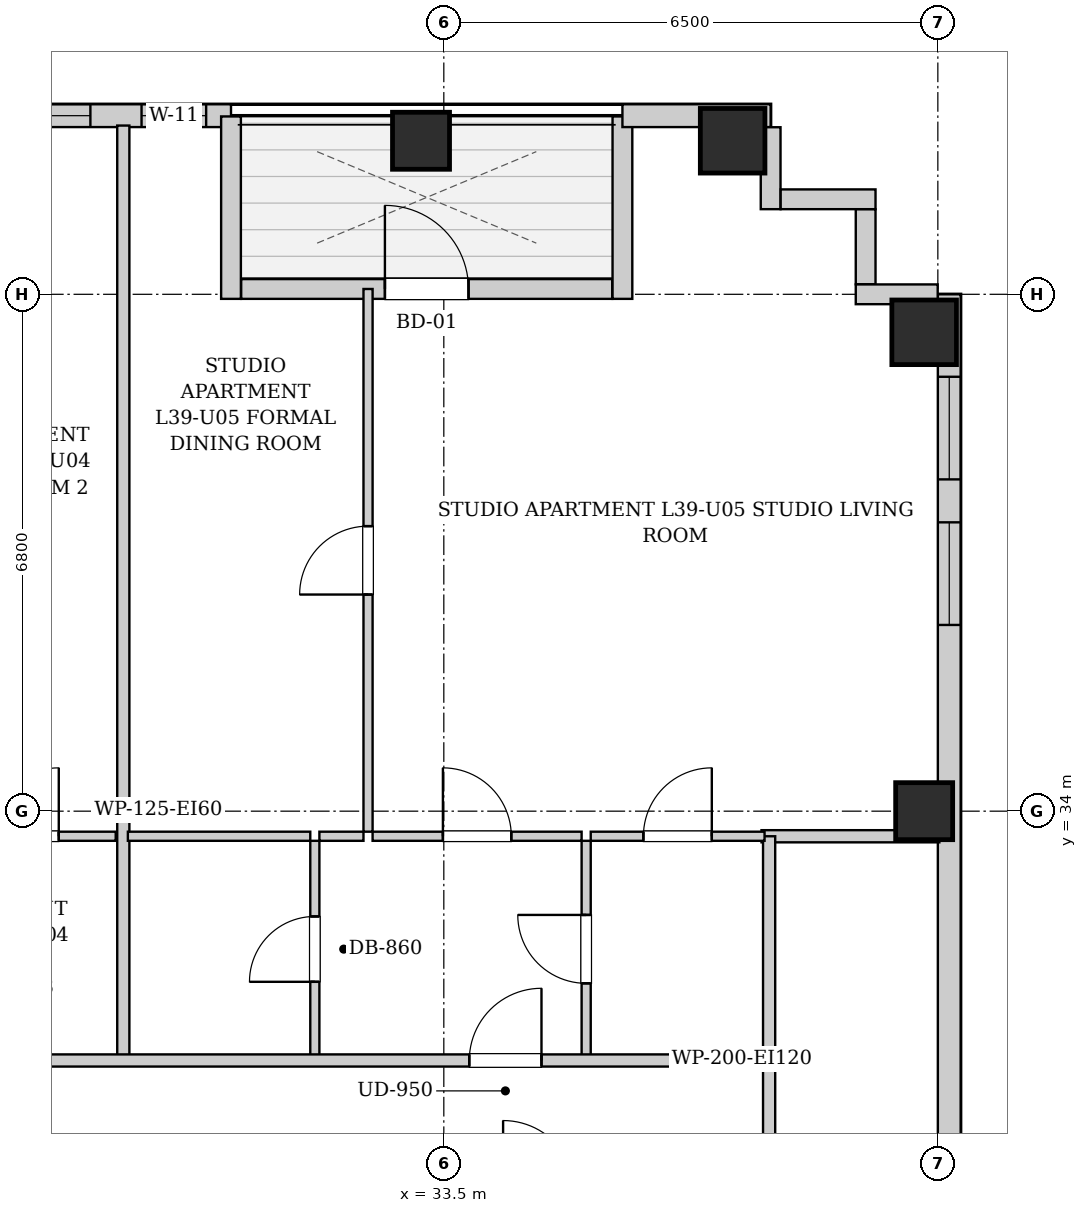
"""IFC4 building model, lengths in metres.
Left out: names, types, materials, properties, quantities, classifications, styles, units other than length and angle.
Written with IfcOpenShell. Run it as: python <this file> out.ifc"""

import sys

from ifc_helpers import new_model, si_unit, direction, frame, frame_2d, origin, origin_2d, place, context, subcontext, project, spatial, rectangle, extrude, element, fill, save


model = new_model("IFC4")
c1 = context("Model", 3, precision=1e-05, world=origin(), true_north=direction((0.0, 1.0)))
c2 = subcontext(c1, "Body", "Model", "MODEL_VIEW")
j1 = project(units=[si_unit("LENGTHUNIT", "METRE"), si_unit("PLANEANGLEUNIT", "RADIAN")], contexts=[c1])
p1 = place(None, origin())
s1 = spatial("IfcSite", under=j1, at=p1, CompositionType="ELEMENT")
p2 = place(p1, origin())
s2 = spatial("IfcBuilding", under=s1, at=p2, CompositionType="ELEMENT")
p3 = place(p2, frame((0.0, 0.0, 137.4)))
s3 = spatial("IfcBuildingStorey", under=s2, at=p3, CompositionType="ELEMENT", Elevation=137.4)
p4 = place(p3, frame((33.2, 42.82, 0.0), z_axis=(0.0, 0.0, 1.0), x_axis=(1.0, 0.0, 0.0)))
e1 = element("IfcColumn", 1, at=p4, inside=s3, PredefinedType="COLUMN", context=c2, shape_type="SweptSolid", body=[
    extrude(rectangle(XDim=0.75, YDim=0.75, at=origin_2d()), origin(), (0.0, 0.0, 1.0), 3.25),
])
p5 = place(p3, frame((37.3, 42.82, 0.0), z_axis=(0.0, 0.0, 1.0), x_axis=(1.0, 0.0, 0.0)))
e2 = element("IfcColumn", 2, at=p5, inside=s3, PredefinedType="COLUMN", context=c2, shape_type="SweptSolid", body=[
    extrude(rectangle(XDim=0.85, YDim=0.85, at=origin_2d()), origin(), (0.0, 0.0, 1.0), 3.25),
])
p6 = place(p3, frame((39.82, 34.0, 0.0), z_axis=(0.0, 0.0, 1.0), x_axis=(1.0, 0.0, 0.0)))
e3 = element("IfcColumn", 3, at=p6, inside=s3, PredefinedType="COLUMN", context=c2, shape_type="SweptSolid", body=[
    extrude(rectangle(XDim=0.75, YDim=0.75, at=origin_2d()), origin(), (0.0, 0.0, 1.0), 3.25),
])
p7 = place(p3, frame((39.82, 40.3, 0.0), z_axis=(0.0, 0.0, 1.0), x_axis=(1.0, 0.0, 0.0)))
e4 = element("IfcColumn", 4, at=p7, inside=s3, PredefinedType="COLUMN", context=c2, shape_type="SweptSolid", body=[
    extrude(rectangle(XDim=0.85, YDim=0.85, at=origin_2d()), origin(), (0.0, 0.0, 1.0), 3.25),
])
p8 = place(p3, frame((16.6, 43.15, 0.0), z_axis=(0.0, 0.0, 1.0), x_axis=(1.0, 0.0, 0.0)))
e5 = element("IfcWall", 5, at=p8, inside=s3, PredefinedType="SOLIDWALL", context=c2, shape_type="SweptSolid", body=[
    extrude(rectangle(XDim=14.1, YDim=0.3, at=frame_2d((7.05, 0.0))), origin(), (0.0, 0.0, 1.0), 2.99),
])
p9 = place(p8, frame((2.357, 0.0, 0.55)))
e6 = element("IfcOpeningElement", 6, at=p9, cuts=e5, PredefinedType="OPENING", context=c2, shape_type="SweptSolid", body=[
    extrude(rectangle(XDim=1.35, YDim=1.2, at=frame_2d((0.675, 0.6))), frame((0.0, 0.16, 0.0), z_axis=(0.0, -1.0, 0.0), x_axis=(1.0, 0.0, 0.0)), (0.0, 0.0, 1.0), 0.32),
])
p10 = place(p8, frame((4.55, 0.0, 0.55)))
e7 = element("IfcOpeningElement", 7, at=p10, cuts=e5, PredefinedType="OPENING", context=c2, shape_type="SweptSolid", body=[
    extrude(rectangle(XDim=1.35, YDim=1.2, at=frame_2d((0.675, 0.6))), frame((0.0, 0.16, 0.0), z_axis=(0.0, -1.0, 0.0), x_axis=(1.0, 0.0, 0.0)), (0.0, 0.0, 1.0), 0.32),
])
p11 = place(p8, frame((10.9, 0.0, 0.55)))
e8 = element("IfcOpeningElement", 8, at=p11, cuts=e5, PredefinedType="OPENING", context=c2, shape_type="SweptSolid", body=[
    extrude(rectangle(XDim=1.35, YDim=1.2, at=frame_2d((0.675, 0.6))), frame((0.0, 0.16, 0.0), z_axis=(0.0, -1.0, 0.0), x_axis=(1.0, 0.0, 0.0)), (0.0, 0.0, 1.0), 0.32),
])
p12 = place(p8, frame((12.923, 0.0, 0.55)))
e9 = element("IfcOpeningElement", 9, at=p12, cuts=e5, PredefinedType="OPENING", context=c2, shape_type="SweptSolid", body=[
    extrude(rectangle(XDim=0.85, YDim=1.2, at=frame_2d((0.425, 0.6))), frame((0.0, 0.16, 0.0), z_axis=(0.0, -1.0, 0.0), x_axis=(1.0, 0.0, 0.0)), (0.0, 0.0, 1.0), 0.32),
])
p13 = place(p3, frame((30.7, 43.14, 0.0), z_axis=(0.0, 0.0, 1.0), x_axis=(0.0, -1.0, 0.0)))
e10 = element("IfcWall", 10, at=p13, inside=s3, PredefinedType="SOLIDWALL", context=c2, shape_type="SweptSolid", body=[
    extrude(rectangle(XDim=2.4, YDim=0.26, at=frame_2d((1.2, 0.0))), origin(), (0.0, 0.0, 1.0), 2.99),
])
p14 = place(p3, frame((30.834, 40.87, 0.0), z_axis=(0.0, 0.0, 1.0), x_axis=(1.0, 0.0, 0.0)))
e11 = element("IfcWall", 11, at=p14, inside=s3, PredefinedType="SOLIDWALL", context=c2, shape_type="SweptSolid", body=[
    extrude(rectangle(XDim=4.882, YDim=0.26, at=frame_2d((2.441, 0.0))), origin(), (0.0, 0.0, 1.0), 2.99),
])
p15 = place(p14, frame((1.891, 0.0, 0.0)))
e12 = element("IfcOpeningElement", 12, at=p15, cuts=e11, PredefinedType="OPENING", context=c2, shape_type="SweptSolid", body=[
    extrude(rectangle(XDim=1.1, YDim=2.0, at=frame_2d((0.55, 1.0))), frame((0.0, 0.14, 0.0), z_axis=(0.0, -1.0, 0.0), x_axis=(1.0, 0.0, 0.0)), (0.0, 0.0, 1.0), 0.28),
])
p16 = place(p3, frame((35.85, 40.74, 0.0), z_axis=(0.0, 0.0, 1.0), x_axis=(0.0, 1.0, 0.0)))
e13 = element("IfcWall", 13, at=p16, inside=s3, PredefinedType="SOLIDWALL", context=c2, shape_type="SweptSolid", body=[
    extrude(rectangle(XDim=2.4, YDim=0.26, at=frame_2d((1.2, 0.0))), origin(), (0.0, 0.0, 1.0), 2.99),
])
p17 = place(p3, frame((35.85, 43.15, 0.0), z_axis=(0.0, 0.0, 1.0), x_axis=(1.0, 0.0, 0.0)))
e14 = element("IfcWall", 14, at=p17, inside=s3, PredefinedType="SOLIDWALL", context=c2, shape_type="SweptSolid", body=[
    extrude(rectangle(XDim=1.95, YDim=0.3, at=frame_2d((0.975, 0.0))), origin(), (0.0, 0.0, 1.0), 2.99),
])
p18 = place(p3, frame((40.15, 40.8, 0.0), z_axis=(0.0, 0.0, 1.0), x_axis=(0.0, -1.0, 0.0)))
e15 = element("IfcWall", 15, at=p18, inside=s3, PredefinedType="SOLIDWALL", context=c2, shape_type="SweptSolid", body=[
    extrude(rectangle(XDim=34.5, YDim=0.3, at=frame_2d((17.25, 0.0))), origin(), (0.0, 0.0, 1.0), 2.99),
])
p19 = place(p18, frame((31.725, 0.0, 0.55)))
e16 = element("IfcOpeningElement", 16, at=p19, cuts=e15, PredefinedType="OPENING", context=c2, shape_type="SweptSolid", body=[
    extrude(rectangle(XDim=1.35, YDim=1.2, at=frame_2d((0.675, 0.6))), frame((0.0, 0.16, 0.0), z_axis=(0.0, -1.0, 0.0), x_axis=(1.0, 0.0, 0.0)), (0.0, 0.0, 1.0), 0.32),
])
p20 = place(p18, frame((3.0, 0.0, 0.55)))
e17 = element("IfcOpeningElement", 17, at=p20, cuts=e15, PredefinedType="OPENING", context=c2, shape_type="SweptSolid", body=[
    extrude(rectangle(XDim=1.35, YDim=1.2, at=frame_2d((0.675, 0.6))), frame((0.0, 0.16, 0.0), z_axis=(0.0, -1.0, 0.0), x_axis=(1.0, 0.0, 0.0)), (0.0, 0.0, 1.0), 0.32),
])
p21 = place(p18, frame((1.085, 0.0, 0.55)))
e18 = element("IfcOpeningElement", 18, at=p21, cuts=e15, PredefinedType="OPENING", context=c2, shape_type="SweptSolid", body=[
    extrude(rectangle(XDim=1.35, YDim=1.2, at=frame_2d((0.675, 0.6))), frame((0.0, 0.16, 0.0), z_axis=(0.0, -1.0, 0.0), x_axis=(1.0, 0.0, 0.0)), (0.0, 0.0, 1.0), 0.32),
])
p22 = place(p18, frame((21.3, 0.0, 0.55)))
e19 = element("IfcOpeningElement", 19, at=p22, cuts=e15, PredefinedType="OPENING", context=c2, shape_type="SweptSolid", body=[
    extrude(rectangle(XDim=1.35, YDim=1.2, at=frame_2d((0.675, 0.6))), frame((0.0, 0.16, 0.0), z_axis=(0.0, -1.0, 0.0), x_axis=(1.0, 0.0, 0.0)), (0.0, 0.0, 1.0), 0.32),
])
p23 = place(p18, frame((22.91, 0.0, 0.55)))
e20 = element("IfcOpeningElement", 20, at=p23, cuts=e15, PredefinedType="OPENING", context=c2, shape_type="SweptSolid", body=[
    extrude(rectangle(XDim=1.35, YDim=1.2, at=frame_2d((0.675, 0.6))), frame((0.0, 0.16, 0.0), z_axis=(0.0, -1.0, 0.0), x_axis=(1.0, 0.0, 0.0)), (0.0, 0.0, 1.0), 0.32),
])
p24 = place(p18, frame((14.175, 0.0, 0.55)))
e21 = element("IfcOpeningElement", 21, at=p24, cuts=e15, PredefinedType="OPENING", context=c2, shape_type="SweptSolid", body=[
    extrude(rectangle(XDim=1.35, YDim=1.2, at=frame_2d((0.675, 0.6))), frame((0.0, 0.16, 0.0), z_axis=(0.0, -1.0, 0.0), x_axis=(1.0, 0.0, 0.0)), (0.0, 0.0, 1.0), 0.32),
])
p25 = place(p18, frame((12.335, 0.0, 0.55)))
e22 = element("IfcOpeningElement", 22, at=p25, cuts=e15, PredefinedType="OPENING", context=c2, shape_type="SweptSolid", body=[
    extrude(rectangle(XDim=1.35, YDim=1.2, at=frame_2d((0.675, 0.6))), frame((0.0, 0.16, 0.0), z_axis=(0.0, -1.0, 0.0), x_axis=(1.0, 0.0, 0.0)), (0.0, 0.0, 1.0), 0.32),
])
p26 = place(p3, frame((37.8, 42.998, 0.0), z_axis=(0.0, 0.0, 1.0), x_axis=(0.0, -1.0, 0.0)))
e23 = element("IfcWall", 23, at=p26, inside=s3, PredefinedType="SOLIDWALL", context=c2, shape_type="SweptSolid", body=[
    extrude(rectangle(XDim=1.078, YDim=0.26, at=frame_2d((0.539, 0.0))), origin(), (0.0, 0.0, 1.0), 2.99),
])
p27 = place(p3, frame((37.932, 42.05, 0.0), z_axis=(0.0, 0.0, 1.0), x_axis=(1.0, 0.0, 0.0)))
e24 = element("IfcWall", 24, at=p27, inside=s3, PredefinedType="SOLIDWALL", context=c2, shape_type="SweptSolid", body=[
    extrude(rectangle(XDim=1.248, YDim=0.26, at=frame_2d((0.624, 0.0))), origin(), (0.0, 0.0, 1.0), 2.99),
])
p28 = place(p3, frame((39.05, 41.918, 0.0), z_axis=(0.0, 0.0, 1.0), x_axis=(0.0, -1.0, 0.0)))
e25 = element("IfcWall", 25, at=p28, inside=s3, PredefinedType="SOLIDWALL", context=c2, shape_type="SweptSolid", body=[
    extrude(rectangle(XDim=0.986, YDim=0.26, at=frame_2d((0.493, 0.0))), origin(), (0.0, 0.0, 1.0), 2.99),
])
p29 = place(p3, frame((38.92, 40.8, 0.0), z_axis=(0.0, 0.0, 1.0), x_axis=(1.0, 0.0, 0.0)))
e26 = element("IfcWall", 26, at=p29, inside=s3, PredefinedType="SOLIDWALL", context=c2, shape_type="SweptSolid", body=[
    extrude(rectangle(XDim=1.078, YDim=0.26, at=frame_2d((0.539, 0.0))), origin(), (0.0, 0.0, 1.0), 2.99),
])
p30 = place(p3, frame((37.78, 28.98, 0.0), z_axis=(0.0, 0.0, 1.0), x_axis=(0.0, 1.0, 0.0)))
e27 = element("IfcWall", 27, at=p30, inside=s3, PredefinedType="PARTITIONING", context=c2, shape_type="SweptSolid", body=[
    extrude(rectangle(XDim=1.74, YDim=0.16, at=frame_2d((0.87, 0.0))), origin(), (0.0, 0.0, 1.0), 2.99),
])
p31 = place(p3, frame((26.785, 33.67, 0.0), z_axis=(0.0, 0.0, 1.0), x_axis=(1.0, 0.0, 0.0)))
e28 = element("IfcWall", 28, at=p31, inside=s3, PredefinedType="PARTITIONING", context=c2, shape_type="SweptSolid", body=[
    extrude(rectangle(XDim=2.398, YDim=0.12, at=frame_2d((1.199, 0.0))), origin(), (0.0, 0.0, 1.0), 2.99),
])
p32 = place(p31, frame((0.749, 0.0, 0.0)))
e29 = element("IfcOpeningElement", 29, at=p32, cuts=e28, PredefinedType="OPENING", context=c2, shape_type="SweptSolid", body=[
    extrude(rectangle(XDim=0.9, YDim=2.05, at=frame_2d((0.45, 1.025))), frame((0.0, 0.07, 0.0), z_axis=(0.0, -1.0, 0.0), x_axis=(1.0, 0.0, 0.0)), (0.0, 0.0, 1.0), 0.14),
])
p33 = place(p3, frame((37.68, 33.67, 0.0), z_axis=(0.0, 0.0, 1.0), x_axis=(1.0, 0.0, 0.0)))
e30 = element("IfcWall", 30, at=p33, inside=s3, PredefinedType="PARTITIONING", context=c2, shape_type="SweptSolid", body=[
    extrude(rectangle(XDim=2.34, YDim=0.16, at=frame_2d((1.17, 0.0))), origin(), (0.0, 0.0, 1.0), 2.99),
])
p34 = place(p3, frame((37.78, 30.76, 0.0), z_axis=(0.0, 0.0, 1.0), x_axis=(0.0, 1.0, 0.0)))
e31 = element("IfcWall", 31, at=p34, inside=s3, PredefinedType="PARTITIONING", context=c2, shape_type="SweptSolid", body=[
    extrude(rectangle(XDim=2.91, YDim=0.16, at=frame_2d((1.455, 0.0))), origin(), (0.0, 0.0, 1.0), 2.99),
])
p35 = place(p3, frame((29.283, 30.76, 0.0), z_axis=(0.0, 0.0, 1.0), x_axis=(0.0, 1.0, 0.0)))
e32 = element("IfcWall", 32, at=p35, inside=s3, PredefinedType="PARTITIONING", context=c2, shape_type="SweptSolid", body=[
    extrude(rectangle(XDim=12.26, YDim=0.16, at=frame_2d((6.13, 0.0))), origin(), (0.0, 0.0, 1.0), 2.99),
])
p36 = place(p3, frame((31.803, 30.76, 0.0), z_axis=(0.0, 0.0, 1.0), x_axis=(0.0, 1.0, 0.0)))
e33 = element("IfcWall", 33, at=p36, inside=s3, PredefinedType="PARTITIONING", context=c2, shape_type="SweptSolid", body=[
    extrude(rectangle(XDim=2.85, YDim=0.12, at=frame_2d((1.425, 0.0))), origin(), (0.0, 0.0, 1.0), 2.99),
])
p37 = place(p36, frame((0.995, 0.0, 0.0)))
e34 = element("IfcOpeningElement", 34, at=p37, cuts=e33, PredefinedType="OPENING", context=c2, shape_type="SweptSolid", body=[
    extrude(rectangle(XDim=0.86, YDim=2.05, at=frame_2d((0.43, 1.025))), frame((0.0, 0.07, 0.0), z_axis=(0.0, -1.0, 0.0), x_axis=(1.0, 0.0, 0.0)), (0.0, 0.0, 1.0), 0.14),
])
p38 = place(p3, frame((29.343, 33.67, 0.0), z_axis=(0.0, 0.0, 1.0), x_axis=(1.0, 0.0, 0.0)))
e35 = element("IfcWall", 35, at=p38, inside=s3, PredefinedType="PARTITIONING", context=c2, shape_type="SweptSolid", body=[
    extrude(rectangle(XDim=2.4, YDim=0.12, at=frame_2d((1.2, 0.0))), origin(), (0.0, 0.0, 1.0), 2.99),
])
p39 = place(p3, frame((35.373, 30.76, 0.0), z_axis=(0.0, 0.0, 1.0), x_axis=(0.0, 1.0, 0.0)))
e36 = element("IfcWall", 36, at=p39, inside=s3, PredefinedType="PARTITIONING", context=c2, shape_type="SweptSolid", body=[
    extrude(rectangle(XDim=2.85, YDim=0.12, at=frame_2d((1.425, 0.0))), origin(), (0.0, 0.0, 1.0), 2.99),
])
p40 = place(p39, frame((0.975, 0.0, 0.0)))
e37 = element("IfcOpeningElement", 37, at=p40, cuts=e36, PredefinedType="OPENING", context=c2, shape_type="SweptSolid", body=[
    extrude(rectangle(XDim=0.9, YDim=2.05, at=frame_2d((0.45, 1.025))), frame((0.0, 0.07, 0.0), z_axis=(0.0, -1.0, 0.0), x_axis=(1.0, 0.0, 0.0)), (0.0, 0.0, 1.0), 0.14),
])
p41 = place(p3, frame((31.863, 33.67, 0.0), z_axis=(0.0, 0.0, 1.0), x_axis=(1.0, 0.0, 0.0)))
e38 = element("IfcWall", 38, at=p41, inside=s3, PredefinedType="PARTITIONING", context=c2, shape_type="SweptSolid", body=[
    extrude(rectangle(XDim=0.58, YDim=0.12, at=frame_2d((0.29, 0.0))), origin(), (0.0, 0.0, 1.0), 2.99),
])
p42 = place(p3, frame((32.563, 33.67, 0.0), z_axis=(0.0, 0.0, 1.0), x_axis=(1.0, 0.0, 0.0)))
e39 = element("IfcWall", 39, at=p42, inside=s3, PredefinedType="PARTITIONING", context=c2, shape_type="SweptSolid", body=[
    extrude(rectangle(XDim=2.75, YDim=0.12, at=frame_2d((1.375, 0.0))), origin(), (0.0, 0.0, 1.0), 2.99),
])
p43 = place(p42, frame((0.925, 0.0, 0.0)))
e40 = element("IfcOpeningElement", 40, at=p43, cuts=e39, PredefinedType="OPENING", context=c2, shape_type="SweptSolid", body=[
    extrude(rectangle(XDim=0.9, YDim=2.05, at=frame_2d((0.45, 1.025))), frame((0.0, 0.07, 0.0), z_axis=(0.0, -1.0, 0.0), x_axis=(1.0, 0.0, 0.0)), (0.0, 0.0, 1.0), 0.14),
])
p44 = place(p3, frame((35.433, 33.67, 0.0), z_axis=(0.0, 0.0, 1.0), x_axis=(1.0, 0.0, 0.0)))
e41 = element("IfcWall", 41, at=p44, inside=s3, PredefinedType="PARTITIONING", context=c2, shape_type="SweptSolid", body=[
    extrude(rectangle(XDim=2.287, YDim=0.12, at=frame_2d((1.144, 0.0))), origin(), (0.0, 0.0, 1.0), 2.99),
])
p45 = place(p44, frame((0.693, 0.0, 0.0)))
e42 = element("IfcOpeningElement", 42, at=p45, cuts=e41, PredefinedType="OPENING", context=c2, shape_type="SweptSolid", body=[
    extrude(rectangle(XDim=0.9, YDim=2.05, at=frame_2d((0.45, 1.025))), frame((0.0, 0.07, 0.0), z_axis=(0.0, -1.0, 0.0), x_axis=(1.0, 0.0, 0.0)), (0.0, 0.0, 1.0), 0.14),
])
p46 = place(p3, frame((32.503, 33.73, 0.0), z_axis=(0.0, 0.0, 1.0), x_axis=(0.0, 1.0, 0.0)))
e43 = element("IfcWall", 43, at=p46, inside=s3, PredefinedType="PARTITIONING", context=c2, shape_type="SweptSolid", body=[
    extrude(rectangle(XDim=7.14, YDim=0.12, at=frame_2d((3.57, 0.0))), origin(), (0.0, 0.0, 1.0), 2.99),
])
p47 = place(p46, frame((3.12, 0.0, 0.0)))
e44 = element("IfcOpeningElement", 44, at=p47, cuts=e43, PredefinedType="OPENING", context=c2, shape_type="SweptSolid", body=[
    extrude(rectangle(XDim=0.9, YDim=2.05, at=frame_2d((0.45, 1.025))), frame((0.0, 0.07, 0.0), z_axis=(0.0, -1.0, 0.0), x_axis=(1.0, 0.0, 0.0)), (0.0, 0.0, 1.0), 0.14),
])
p48 = place(p3, frame((10.05, 30.72, 0.0), z_axis=(0.0, 0.0, 1.0), x_axis=(1.0, 0.0, 0.0)))
e45 = element("IfcWall", 45, at=p48, inside=s3, PredefinedType="PARTITIONING", context=c2, shape_type="SweptSolid", body=[
    extrude(rectangle(XDim=27.7, YDim=0.16, at=frame_2d((13.85, 0.0))), origin(), (0.0, 0.0, 1.0), 2.99),
])
p49 = place(p48, frame((4.165, 0.0, 0.0)))
e46 = element("IfcOpeningElement", 46, at=p49, cuts=e45, PredefinedType="OPENING", context=c2, shape_type="SweptSolid", body=[
    extrude(rectangle(XDim=0.95, YDim=2.1, at=frame_2d((0.475, 1.05))), frame((0.0, 0.09, 0.0), z_axis=(0.0, -1.0, 0.0), x_axis=(1.0, 0.0, 0.0)), (0.0, 0.0, 1.0), 0.18),
])
p50 = place(p48, frame((23.785, 0.0, 0.0)))
e47 = element("IfcOpeningElement", 47, at=p50, cuts=e45, PredefinedType="OPENING", context=c2, shape_type="SweptSolid", body=[
    extrude(rectangle(XDim=0.95, YDim=2.1, at=frame_2d((0.475, 1.05))), frame((0.0, 0.09, 0.0), z_axis=(0.0, -1.0, 0.0), x_axis=(1.0, 0.0, 0.0)), (0.0, 0.0, 1.0), 0.18),
])
p51 = place(p32, origin())
e48 = element("IfcDoor", 48, at=p51, inside=s3, OperationType="SINGLE_SWING_RIGHT", PredefinedType="DOOR", context=c2, shape_type="SweptSolid", body=[
    extrude(rectangle(XDim=0.9, YDim=2.05, at=frame_2d((0.45, 1.025))), frame((0.0, 0.025, 0.0), z_axis=(0.0, -1.0, 0.0), x_axis=(1.0, 0.0, 0.0)), (0.0, 0.0, 1.0), 0.05),
])
fill(e29, e48)
p52 = place(p37, origin())
e49 = element("IfcDoor", 49, at=p52, inside=s3, OperationType="SINGLE_SWING_LEFT", PredefinedType="DOOR", context=c2, shape_type="SweptSolid", body=[
    extrude(rectangle(XDim=0.86, YDim=2.05, at=frame_2d((0.43, 1.025))), frame((0.0, 0.025, 0.0), z_axis=(0.0, -1.0, 0.0), x_axis=(1.0, 0.0, 0.0)), (0.0, 0.0, 1.0), 0.05),
])
fill(e34, e49)
p53 = place(p40, origin())
e50 = element("IfcDoor", 50, at=p53, inside=s3, OperationType="SINGLE_SWING_RIGHT", PredefinedType="DOOR", context=c2, shape_type="SweptSolid", body=[
    extrude(rectangle(XDim=0.9, YDim=2.05, at=frame_2d((0.45, 1.025))), frame((0.0, 0.025, 0.0), z_axis=(0.0, -1.0, 0.0), x_axis=(1.0, 0.0, 0.0)), (0.0, 0.0, 1.0), 0.05),
])
fill(e37, e50)
p54 = place(p43, origin())
e51 = element("IfcDoor", 51, at=p54, inside=s3, OperationType="SINGLE_SWING_LEFT", PredefinedType="DOOR", context=c2, shape_type="SweptSolid", body=[
    extrude(rectangle(XDim=0.9, YDim=2.05, at=frame_2d((0.45, 1.025))), frame((0.0, 0.025, 0.0), z_axis=(0.0, -1.0, 0.0), x_axis=(1.0, 0.0, 0.0)), (0.0, 0.0, 1.0), 0.05),
])
fill(e40, e51)
p55 = place(p45, origin())
e52 = element("IfcDoor", 52, at=p55, inside=s3, OperationType="SINGLE_SWING_RIGHT", PredefinedType="DOOR", context=c2, shape_type="SweptSolid", body=[
    extrude(rectangle(XDim=0.9, YDim=2.05, at=frame_2d((0.45, 1.025))), frame((0.0, 0.025, 0.0), z_axis=(0.0, -1.0, 0.0), x_axis=(1.0, 0.0, 0.0)), (0.0, 0.0, 1.0), 0.05),
])
fill(e42, e52)
p56 = place(p47, origin())
e53 = element("IfcDoor", 53, at=p56, inside=s3, OperationType="SINGLE_SWING_LEFT", PredefinedType="DOOR", context=c2, shape_type="SweptSolid", body=[
    extrude(rectangle(XDim=0.9, YDim=2.05, at=frame_2d((0.45, 1.025))), frame((0.0, 0.025, 0.0), z_axis=(0.0, -1.0, 0.0), x_axis=(1.0, 0.0, 0.0)), (0.0, 0.0, 1.0), 0.05),
])
fill(e44, e53)
p57 = place(p50, origin())
e54 = element("IfcDoor", 54, at=p57, inside=s3, OperationType="SINGLE_SWING_RIGHT", PredefinedType="DOOR", context=c2, shape_type="SweptSolid", body=[
    extrude(rectangle(XDim=0.95, YDim=2.1, at=frame_2d((0.475, 1.05))), frame((0.0, 0.025, 0.0), z_axis=(0.0, -1.0, 0.0), x_axis=(1.0, 0.0, 0.0)), (0.0, 0.0, 1.0), 0.05),
])
fill(e47, e54)
p58 = place(p15, origin())
e55 = element("IfcDoor", 55, at=p58, inside=s3, OperationType="SINGLE_SWING_LEFT", PredefinedType="DOOR", context=c2, shape_type="SweptSolid", body=[
    extrude(rectangle(XDim=1.1, YDim=2.0, at=frame_2d((0.55, 1.0))), frame((0.0, 0.025, 0.0), z_axis=(0.0, -1.0, 0.0), x_axis=(1.0, 0.0, 0.0)), (0.0, 0.0, 1.0), 0.05),
])
fill(e12, e55)
p59 = place(p11, origin())
e56 = element("IfcWindow", 56, at=p59, inside=s3, PartitioningType="SINGLE_PANEL", PredefinedType="WINDOW", context=c2, shape_type="SweptSolid", body=[
    extrude(rectangle(XDim=1.35, YDim=1.2, at=frame_2d((0.675, 0.6))), frame((0.0, 0.03, 0.0), z_axis=(0.0, -1.0, 0.0), x_axis=(1.0, 0.0, 0.0)), (0.0, 0.0, 1.0), 0.06),
])
fill(e8, e56)
p60 = place(p12, origin())
e57 = element("IfcWindow", 57, at=p60, inside=s3, PartitioningType="SINGLE_PANEL", PredefinedType="WINDOW", context=c2, shape_type="SweptSolid", body=[
    extrude(rectangle(XDim=0.85, YDim=1.2, at=frame_2d((0.425, 0.6))), frame((0.0, 0.03, 0.0), z_axis=(0.0, -1.0, 0.0), x_axis=(1.0, 0.0, 0.0)), (0.0, 0.0, 1.0), 0.06),
])
fill(e9, e57)
p61 = place(p20, origin())
e58 = element("IfcWindow", 58, at=p61, inside=s3, PartitioningType="SINGLE_PANEL", PredefinedType="WINDOW", context=c2, shape_type="SweptSolid", body=[
    extrude(rectangle(XDim=1.35, YDim=1.2, at=frame_2d((0.675, 0.6))), frame((0.0, 0.03, 0.0), z_axis=(0.0, -1.0, 0.0), x_axis=(1.0, 0.0, 0.0)), (0.0, 0.0, 1.0), 0.06),
])
fill(e17, e58)
p62 = place(p21, origin())
e59 = element("IfcWindow", 59, at=p62, inside=s3, PartitioningType="SINGLE_PANEL", PredefinedType="WINDOW", context=c2, shape_type="SweptSolid", body=[
    extrude(rectangle(XDim=1.35, YDim=1.2, at=frame_2d((0.675, 0.6))), frame((0.0, 0.03, 0.0), z_axis=(0.0, -1.0, 0.0), x_axis=(1.0, 0.0, 0.0)), (0.0, 0.0, 1.0), 0.06),
])
fill(e18, e59)
save(model, sys.argv[1])
